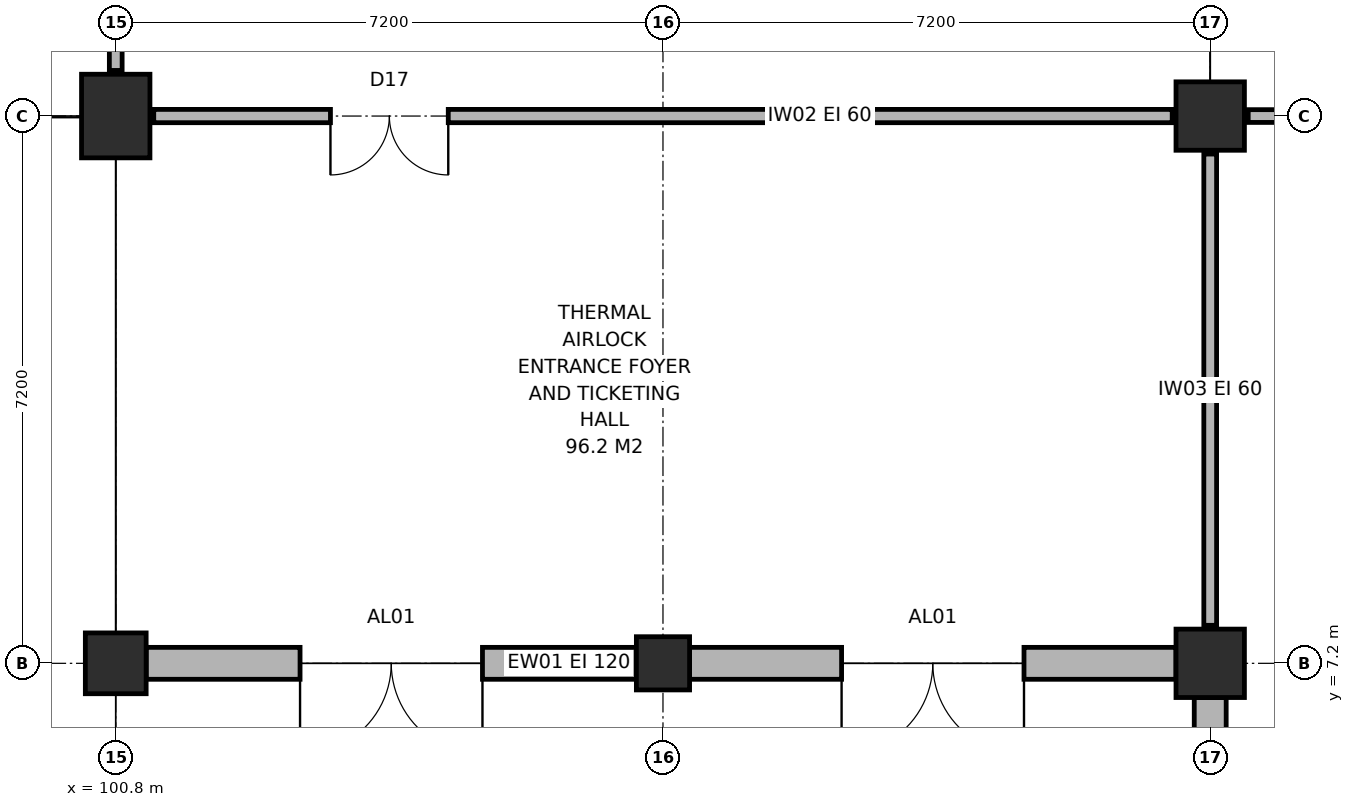
"""IFC4 building model, lengths in metres.
Left out: names, types, materials, properties, quantities, classifications, styles, units other than length and angle.
Written with IfcOpenShell. Run it as: python <this file> out.ifc"""

import sys

from ifc_helpers import new_model, si_unit, direction, frame, frame_2d, origin, origin_2d, place, context, subcontext, project, spatial, rectangle, circle, extrude, element, fill, save


model = new_model("IFC4")
c1 = context("Model", 3, precision=1e-05, world=origin(), true_north=direction((0.0, 1.0)))
c2 = subcontext(c1, "Body", "Model", "MODEL_VIEW")
j1 = project(units=[si_unit("LENGTHUNIT", "METRE"), si_unit("PLANEANGLEUNIT", "RADIAN")], contexts=[c1])
p1 = place(None, origin())
s1 = spatial("IfcSite", under=j1, at=p1, CompositionType="ELEMENT")
p2 = place(p1, origin())
s2 = spatial("IfcBuilding", under=s1, at=p2, CompositionType="ELEMENT")
p3 = place(p2, origin())
s3 = spatial("IfcBuildingStorey", under=s2, at=p3, CompositionType="ELEMENT", Elevation=0.0)
p4 = place(p3, frame((100.8, 7.2, 0.0), z_axis=(0.0, 0.0, 1.0), x_axis=(1.0, 0.0, 0.0)))
e1 = element("IfcColumn", 1, at=p4, inside=s3, PredefinedType="COLUMN", context=c2, shape_type="SweptSolid", body=[
    extrude(circle(Radius=0.4, at=origin_2d()), origin(), (0.0, 0.0, 1.0), 5.4),
])
p5 = place(p3, frame((100.8, 14.4, 0.0), z_axis=(0.0, 0.0, 1.0), x_axis=(1.0, 0.0, 0.0)))
e2 = element("IfcColumn", 2, at=p5, inside=s3, PredefinedType="COLUMN", context=c2, shape_type="SweptSolid", body=[
    extrude(rectangle(XDim=0.9, YDim=1.1, at=origin_2d()), origin(), (0.0, 0.0, 1.0), 5.4),
])
p6 = place(p3, frame((108.0, 7.2, 0.0), z_axis=(0.0, 0.0, 1.0), x_axis=(1.0, 0.0, 0.0)))
e3 = element("IfcColumn", 3, at=p6, inside=s3, PredefinedType="COLUMN", context=c2, shape_type="SweptSolid", body=[
    extrude(rectangle(XDim=0.7, YDim=0.7, at=origin_2d()), origin(), (0.0, 0.0, 1.0), 5.4),
])
for number, where, z_axis, x_axis in (
    (4, (115.2, 7.2, 0.0), (0.0, 0.0, 1.0), (1.0, 0.0, 0.0)),
    (5, (115.2, 14.4, 0.0), (0.0, 0.0, 1.0), (1.0, 0.0, 0.0)),
):
    element("IfcColumn", number, at=place(p3, frame(where, z_axis=z_axis, x_axis=x_axis)), inside=s3, PredefinedType="COLUMN", context=c2, shape_type="SweptSolid", body=[
        extrude(rectangle(XDim=0.9, YDim=0.9, at=origin_2d()), origin(), (0.0, 0.0, 1.0), 5.4),
    ])
p7 = place(p3, frame((101.2, 7.2, 0.0), z_axis=(0.0, 0.0, 1.0), x_axis=(1.0, 0.0, 0.0)))
e6 = element("IfcWall", 6, at=p7, inside=s3, PredefinedType="SOLIDWALL", context=c2, shape_type="SweptSolid", body=[
    extrude(rectangle(XDim=6.45, YDim=0.42, at=frame_2d((3.225, 0.0))), origin(), (0.0, 0.0, 1.0), 4.64),
])
p8 = place(p7, frame((2.025, 0.0, 0.0)))
e7 = element("IfcOpeningElement", 7, at=p8, cuts=e6, PredefinedType="OPENING", context=c2, shape_type="SweptSolid", body=[
    extrude(rectangle(XDim=2.4, YDim=2.5, at=frame_2d((1.2, 1.25))), frame((0.0, 0.225, 0.0), z_axis=(0.0, -1.0, 0.0), x_axis=(1.0, 0.0, 0.0)), (0.0, 0.0, 1.0), 0.45),
])
p9 = place(p3, frame((108.35, 7.2, 0.0), z_axis=(0.0, 0.0, 1.0), x_axis=(1.0, 0.0, 0.0)))
e8 = element("IfcWall", 8, at=p9, inside=s3, PredefinedType="SOLIDWALL", context=c2, shape_type="SweptSolid", body=[
    extrude(rectangle(XDim=6.4, YDim=0.42, at=frame_2d((3.2, 0.0))), origin(), (0.0, 0.0, 1.0), 4.64),
])
p10 = place(p9, frame((2.0, 0.0, 0.0)))
e9 = element("IfcOpeningElement", 9, at=p10, cuts=e8, PredefinedType="OPENING", context=c2, shape_type="SweptSolid", body=[
    extrude(rectangle(XDim=2.4, YDim=2.5, at=frame_2d((1.2, 1.25))), frame((0.0, 0.225, 0.0), z_axis=(0.0, -1.0, 0.0), x_axis=(1.0, 0.0, 0.0)), (0.0, 0.0, 1.0), 0.45),
])
p11 = place(p3, frame((115.2, 0.45, 0.0), z_axis=(0.0, 0.0, 1.0), x_axis=(0.0, 1.0, 0.0)))
e10 = element("IfcWall", 10, at=p11, inside=s3, PredefinedType="SOLIDWALL", context=c2, shape_type="SweptSolid", body=[
    extrude(rectangle(XDim=6.3, YDim=0.42, at=frame_2d((3.15, 0.0))), origin(), (0.0, 0.0, 1.0), 4.44),
])
p12 = place(p11, frame((1.95, 0.0, 0.95)))
e11 = element("IfcOpeningElement", 11, at=p12, cuts=e10, PredefinedType="OPENING", context=c2, shape_type="SweptSolid", body=[
    extrude(rectangle(XDim=2.4, YDim=2.65, at=frame_2d((1.2, 1.325))), frame((0.0, 0.225, 0.0), z_axis=(0.0, -1.0, 0.0), x_axis=(1.0, 0.0, 0.0)), (0.0, 0.0, 1.0), 0.45),
])
p13 = place(p3, frame((101.3, 14.4, 0.0), z_axis=(0.0, 0.0, 1.0), x_axis=(1.0, 0.0, 0.0)))
e12 = element("IfcWall", 12, at=p13, inside=s3, PredefinedType="PARTITIONING", context=c2, shape_type="SweptSolid", body=[
    extrude(rectangle(XDim=13.4, YDim=0.175, at=frame_2d((6.7, 0.0))), origin(), (0.0, 0.0, 1.0), 5.14),
])
p14 = place(p13, frame((2.325, 0.0, 0.0)))
e13 = element("IfcOpeningElement", 13, at=p14, cuts=e12, PredefinedType="OPENING", context=c2, shape_type="SweptSolid", body=[
    extrude(rectangle(XDim=1.55, YDim=2.2, at=frame_2d((0.775, 1.1))), frame((0.0, 0.103, 0.0), z_axis=(0.0, -1.0, 0.0), x_axis=(1.0, 0.0, 0.0)), (0.0, 0.0, 1.0), 0.205),
])
p15 = place(p3, frame((115.2, 7.7, 0.0), z_axis=(0.0, 0.0, 1.0), x_axis=(0.0, 1.0, 0.0)))
e14 = element("IfcWall", 14, at=p15, inside=s3, PredefinedType="PARTITIONING", context=c2, shape_type="SweptSolid", body=[
    extrude(rectangle(XDim=6.2, YDim=0.168, at=frame_2d((3.1, 0.0))), origin(), (0.0, 0.0, 1.0), 4.44),
])
p16 = place(p3, frame((100.8, 15.0, 0.0), z_axis=(0.0, 0.0, 1.0), x_axis=(0.0, 1.0, 0.0)))
e15 = element("IfcWall", 15, at=p16, inside=s3, PredefinedType="PARTITIONING", context=c2, shape_type="SweptSolid", body=[
    extrude(rectangle(XDim=6.15, YDim=0.168, at=frame_2d((3.075, 0.0))), origin(), (0.0, 0.0, 1.0), 4.49),
])
p17 = place(p3, frame((115.7, 14.4, 0.0), z_axis=(0.0, 0.0, 1.0), x_axis=(1.0, 0.0, 0.0)))
e16 = element("IfcWall", 16, at=p17, inside=s3, PredefinedType="PARTITIONING", context=c2, shape_type="SweptSolid", body=[
    extrude(rectangle(XDim=6.2, YDim=0.168, at=frame_2d((3.1, 0.0))), origin(), (0.0, 0.0, 1.0), 4.29),
])
p18 = place(p17, frame((2.61, 0.0, 0.0)))
e17 = element("IfcOpeningElement", 17, at=p18, cuts=e16, PredefinedType="OPENING", context=c2, shape_type="SweptSolid", body=[
    extrude(rectangle(XDim=0.98, YDim=2.15, at=frame_2d((0.49, 1.075))), frame((0.0, 0.099, 0.0), z_axis=(0.0, -1.0, 0.0), x_axis=(1.0, 0.0, 0.0)), (0.0, 0.0, 1.0), 0.198),
])
p19 = place(p8, frame((2.4, 0.0, 0.0), z_axis=(0.0, 0.0, 1.0), x_axis=(-1.0, 0.0, 0.0)))
e18 = element("IfcDoor", 18, at=p19, inside=s3, OperationType="DOUBLE_SWING_LEFT", PredefinedType="DOOR", context=c2, shape_type="SweptSolid", body=[
    extrude(rectangle(XDim=2.4, YDim=2.5, at=frame_2d((1.2, 1.25))), frame((0.0, 0.025, 0.0), z_axis=(0.0, -1.0, 0.0), x_axis=(1.0, 0.0, 0.0)), (0.0, 0.0, 1.0), 0.05),
])
fill(e7, e18)
p20 = place(p10, frame((2.4, 0.0, 0.0), z_axis=(0.0, 0.0, 1.0), x_axis=(-1.0, 0.0, 0.0)))
e19 = element("IfcDoor", 19, at=p20, inside=s3, OperationType="DOUBLE_SWING_LEFT", PredefinedType="DOOR", context=c2, shape_type="SweptSolid", body=[
    extrude(rectangle(XDim=2.4, YDim=2.5, at=frame_2d((1.2, 1.25))), frame((0.0, 0.025, 0.0), z_axis=(0.0, -1.0, 0.0), x_axis=(1.0, 0.0, 0.0)), (0.0, 0.0, 1.0), 0.05),
])
fill(e9, e19)
p21 = place(p14, frame((1.55, 0.0, 0.0), z_axis=(0.0, 0.0, 1.0), x_axis=(-1.0, 0.0, 0.0)))
e20 = element("IfcDoor", 20, at=p21, inside=s3, OperationType="DOUBLE_SWING_LEFT", PredefinedType="DOOR", context=c2, shape_type="SweptSolid", body=[
    extrude(rectangle(XDim=1.55, YDim=2.2, at=frame_2d((0.775, 1.1))), frame((0.0, 0.025, 0.0), z_axis=(0.0, -1.0, 0.0), x_axis=(1.0, 0.0, 0.0)), (0.0, 0.0, 1.0), 0.05),
])
fill(e13, e20)
save(model, sys.argv[1])
